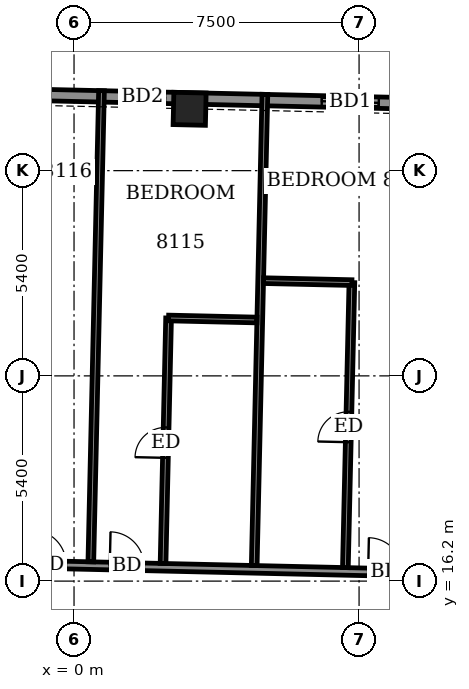
"""IFC4 building model, lengths in metres.
Left out: names, types, materials, properties, quantities, classifications, styles, units other than length and angle.
Written with IfcOpenShell. Run it as: python <this file> out.ifc"""

import sys

from ifc_helpers import new_model, si_unit, direction, frame, frame_2d, origin, origin_2d, place, context, subcontext, project, spatial, rectangle, extrude, element, fill, save


model = new_model("IFC4")
c1 = context("Model", 3, precision=1e-05, world=origin(), true_north=direction((0.0, 1.0)))
c2 = subcontext(c1, "Body", "Model", "MODEL_VIEW")
j1 = project(units=[si_unit("LENGTHUNIT", "METRE"), si_unit("PLANEANGLEUNIT", "RADIAN")], contexts=[c1])
p1 = place(None, origin())
s1 = spatial("IfcSite", under=j1, at=p1, CompositionType="ELEMENT")
p2 = place(p1, origin())
s2 = spatial("IfcBuilding", under=s1, at=p2, CompositionType="ELEMENT")
p3 = place(p2, frame((0.0, 0.0, 316.9)))
s3 = spatial("IfcBuildingStorey", under=s2, at=p3, CompositionType="ELEMENT", Elevation=316.9)
p4 = place(p3, frame((3.041, 28.627, -0.55), z_axis=(0.0, 0.0, 1.0), x_axis=(-0.999741662484, 0.022729018737, 0.0)))
e1 = element("IfcColumn", 1, at=p4, inside=s3, PredefinedType="COLUMN", context=c2, shape_type="SweptSolid", body=[
    extrude(rectangle(XDim=0.85, YDim=0.85, at=origin_2d()), origin(), (0.0, 0.0, 1.0), 3.6),
])
p5 = place(p3, frame((25.264, 28.397, 0.0), z_axis=(0.0, 0.0, 1.0), x_axis=(-0.999742391375, 0.022696935658, 0.0)))
e2 = element("IfcWall", 2, at=p5, inside=s3, PredefinedType="SOLIDWALL", context=c2, shape_type="SweptSolid", body=[
    extrude(rectangle(XDim=51.9, YDim=0.3, at=frame_2d((25.95, 0.0))), origin(), (0.0, 0.0, 1.0), 2.45),
])
p6 = place(p5, frame((0.874, 0.0, 0.0)))
e3 = element("IfcOpeningElement", 3, at=p6, cuts=e2, PredefinedType="OPENING", context=c2, shape_type="SweptSolid", body=[
    extrude(rectangle(XDim=1.5, YDim=2.4, at=frame_2d((0.75, 1.2))), frame((0.0, 0.16, 0.0), z_axis=(0.0, -1.0, 0.0), x_axis=(1.0, 0.0, 0.0)), (0.0, 0.0, 1.0), 0.32),
])
p7 = place(p5, frame((4.241, 0.0, 0.0)))
e4 = element("IfcOpeningElement", 4, at=p7, cuts=e2, PredefinedType="OPENING", context=c2, shape_type="SweptSolid", body=[
    extrude(rectangle(XDim=1.5, YDim=2.4, at=frame_2d((0.75, 1.2))), frame((0.0, 0.16, 0.0), z_axis=(0.0, -1.0, 0.0), x_axis=(1.0, 0.0, 0.0)), (0.0, 0.0, 1.0), 0.32),
])
p8 = place(p5, frame((8.691, 0.0, 0.0)))
e5 = element("IfcOpeningElement", 5, at=p8, cuts=e2, PredefinedType="OPENING", context=c2, shape_type="SweptSolid", body=[
    extrude(rectangle(XDim=1.5, YDim=2.4, at=frame_2d((0.75, 1.2))), frame((0.0, 0.16, 0.0), z_axis=(0.0, -1.0, 0.0), x_axis=(1.0, 0.0, 0.0)), (0.0, 0.0, 1.0), 0.32),
])
p9 = place(p5, frame((12.245, 0.0, 0.0)))
e6 = element("IfcOpeningElement", 6, at=p9, cuts=e2, PredefinedType="OPENING", context=c2, shape_type="SweptSolid", body=[
    extrude(rectangle(XDim=1.5, YDim=2.4, at=frame_2d((0.75, 1.2))), frame((0.0, 0.16, 0.0), z_axis=(0.0, -1.0, 0.0), x_axis=(1.0, 0.0, 0.0)), (0.0, 0.0, 1.0), 0.32),
])
p10 = place(p5, frame((17.25, 0.0, 0.0)))
e7 = element("IfcOpeningElement", 7, at=p10, cuts=e2, PredefinedType="OPENING", context=c2, shape_type="SweptSolid", body=[
    extrude(rectangle(XDim=1.5, YDim=2.4, at=frame_2d((0.75, 1.2))), frame((0.0, 0.16, 0.0), z_axis=(0.0, -1.0, 0.0), x_axis=(1.0, 0.0, 0.0)), (0.0, 0.0, 1.0), 0.32),
])
p11 = place(p5, frame((22.874, 0.0, 0.0)))
e8 = element("IfcOpeningElement", 8, at=p11, cuts=e2, PredefinedType="OPENING", context=c2, shape_type="SweptSolid", body=[
    extrude(rectangle(XDim=1.2, YDim=2.4, at=frame_2d((0.6, 1.2))), frame((0.0, 0.16, 0.0), z_axis=(0.0, -1.0, 0.0), x_axis=(1.0, 0.0, 0.0)), (0.0, 0.0, 1.0), 0.32),
])
p12 = place(p5, frame((26.1, 0.0, 0.0)))
e9 = element("IfcOpeningElement", 9, at=p12, cuts=e2, PredefinedType="OPENING", context=c2, shape_type="SweptSolid", body=[
    extrude(rectangle(XDim=1.5, YDim=2.4, at=frame_2d((0.75, 1.2))), frame((0.0, 0.16, 0.0), z_axis=(0.0, -1.0, 0.0), x_axis=(1.0, 0.0, 0.0)), (0.0, 0.0, 1.0), 0.32),
])
p13 = place(p5, frame((30.977, 0.0, 0.0)))
e10 = element("IfcOpeningElement", 10, at=p13, cuts=e2, PredefinedType="OPENING", context=c2, shape_type="SweptSolid", body=[
    extrude(rectangle(XDim=1.5, YDim=2.4, at=frame_2d((0.75, 1.2))), frame((0.0, 0.16, 0.0), z_axis=(0.0, -1.0, 0.0), x_axis=(1.0, 0.0, 0.0)), (0.0, 0.0, 1.0), 0.32),
])
p14 = place(p5, frame((34.53, 0.0, 0.0)))
e11 = element("IfcOpeningElement", 11, at=p14, cuts=e2, PredefinedType="OPENING", context=c2, shape_type="SweptSolid", body=[
    extrude(rectangle(XDim=1.5, YDim=2.4, at=frame_2d((0.75, 1.2))), frame((0.0, 0.16, 0.0), z_axis=(0.0, -1.0, 0.0), x_axis=(1.0, 0.0, 0.0)), (0.0, 0.0, 1.0), 0.32),
])
p15 = place(p5, frame((39.425, 0.0, 0.0)))
e12 = element("IfcOpeningElement", 12, at=p15, cuts=e2, PredefinedType="OPENING", context=c2, shape_type="SweptSolid", body=[
    extrude(rectangle(XDim=1.5, YDim=2.4, at=frame_2d((0.75, 1.2))), frame((0.0, 0.16, 0.0), z_axis=(0.0, -1.0, 0.0), x_axis=(1.0, 0.0, 0.0)), (0.0, 0.0, 1.0), 0.32),
])
p16 = place(p5, frame((45.259, 0.0, 0.0)))
e13 = element("IfcOpeningElement", 13, at=p16, cuts=e2, PredefinedType="OPENING", context=c2, shape_type="SweptSolid", body=[
    extrude(rectangle(XDim=1.2, YDim=2.4, at=frame_2d((0.6, 1.2))), frame((0.0, 0.16, 0.0), z_axis=(0.0, -1.0, 0.0), x_axis=(1.0, 0.0, 0.0)), (0.0, 0.0, 1.0), 0.32),
])
p17 = place(p5, frame((47.987, 0.0, 0.9)))
e14 = element("IfcOpeningElement", 14, at=p17, cuts=e2, PredefinedType="OPENING", context=c2, shape_type="SweptSolid", body=[
    extrude(rectangle(XDim=2.4, YDim=1.5, at=frame_2d((1.2, 0.75))), frame((0.0, 0.16, 0.0), z_axis=(0.0, -1.0, 0.0), x_axis=(1.0, 0.0, 0.0)), (0.0, 0.0, 1.0), 0.32),
])
p18 = place(p3, frame((-30.652, 17.313, 0.0), z_axis=(0.0, 0.0, 1.0), x_axis=(0.999742623764, -0.02268669719, 0.0)))
e15 = element("IfcWall", 15, at=p18, inside=s3, PredefinedType="PARTITIONING", context=c2, shape_type="SweptSolid", body=[
    extrude(rectangle(XDim=58.8, YDim=0.2, at=frame_2d((29.4, 0.0))), origin(), (0.0, 0.0, 1.0), 3.05),
])
p19 = place(p18, frame((55.698, 0.0, 0.0)))
e16 = element("IfcOpeningElement", 16, at=p19, cuts=e15, PredefinedType="OPENING", context=c2, shape_type="SweptSolid", body=[
    extrude(rectangle(XDim=1.0, YDim=2.1, at=frame_2d((0.5, 1.05))), frame((0.0, 0.11, 0.0), z_axis=(0.0, -1.0, 0.0), x_axis=(1.0, 0.0, 0.0)), (0.0, 0.0, 1.0), 0.22),
])
p20 = place(p18, frame((49.0, 0.0, 0.0)))
e17 = element("IfcOpeningElement", 17, at=p20, cuts=e15, PredefinedType="OPENING", context=c2, shape_type="SweptSolid", body=[
    extrude(rectangle(XDim=0.9, YDim=2.1, at=frame_2d((0.45, 1.05))), frame((0.0, 0.11, 0.0), z_axis=(0.0, -1.0, 0.0), x_axis=(1.0, 0.0, 0.0)), (0.0, 0.0, 1.0), 0.22),
])
p21 = place(p18, frame((47.125, 0.0, 0.0)))
e18 = element("IfcOpeningElement", 18, at=p21, cuts=e15, PredefinedType="OPENING", context=c2, shape_type="SweptSolid", body=[
    extrude(rectangle(XDim=0.9, YDim=2.1, at=frame_2d((0.45, 1.05))), frame((0.0, 0.11, 0.0), z_axis=(0.0, -1.0, 0.0), x_axis=(1.0, 0.0, 0.0)), (0.0, 0.0, 1.0), 0.22),
])
p22 = place(p18, frame((40.425, 0.0, 0.0)))
e19 = element("IfcOpeningElement", 19, at=p22, cuts=e15, PredefinedType="OPENING", context=c2, shape_type="SweptSolid", body=[
    extrude(rectangle(XDim=0.9, YDim=2.1, at=frame_2d((0.45, 1.05))), frame((0.0, 0.11, 0.0), z_axis=(0.0, -1.0, 0.0), x_axis=(1.0, 0.0, 0.0)), (0.0, 0.0, 1.0), 0.22),
])
p23 = place(p18, frame((38.4, 0.0, 0.0)))
e20 = element("IfcOpeningElement", 20, at=p23, cuts=e15, PredefinedType="OPENING", context=c2, shape_type="SweptSolid", body=[
    extrude(rectangle(XDim=0.9, YDim=2.1, at=frame_2d((0.45, 1.05))), frame((0.0, 0.11, 0.0), z_axis=(0.0, -1.0, 0.0), x_axis=(1.0, 0.0, 0.0)), (0.0, 0.0, 1.0), 0.22),
])
p24 = place(p18, frame((31.6, 0.0, 0.0)))
e21 = element("IfcOpeningElement", 21, at=p24, cuts=e15, PredefinedType="OPENING", context=c2, shape_type="SweptSolid", body=[
    extrude(rectangle(XDim=0.9, YDim=2.1, at=frame_2d((0.45, 1.05))), frame((0.0, 0.11, 0.0), z_axis=(0.0, -1.0, 0.0), x_axis=(1.0, 0.0, 0.0)), (0.0, 0.0, 1.0), 0.22),
])
p25 = place(p18, frame((29.55, 0.0, 0.0)))
e22 = element("IfcOpeningElement", 22, at=p25, cuts=e15, PredefinedType="OPENING", context=c2, shape_type="SweptSolid", body=[
    extrude(rectangle(XDim=0.9, YDim=2.1, at=frame_2d((0.45, 1.05))), frame((0.0, 0.11, 0.0), z_axis=(0.0, -1.0, 0.0), x_axis=(1.0, 0.0, 0.0)), (0.0, 0.0, 1.0), 0.22),
])
p26 = place(p18, frame((22.625, 0.0, 0.0)))
e23 = element("IfcOpeningElement", 23, at=p26, cuts=e15, PredefinedType="OPENING", context=c2, shape_type="SweptSolid", body=[
    extrude(rectangle(XDim=0.9, YDim=2.1, at=frame_2d((0.45, 1.05))), frame((0.0, 0.11, 0.0), z_axis=(0.0, -1.0, 0.0), x_axis=(1.0, 0.0, 0.0)), (0.0, 0.0, 1.0), 0.22),
])
p27 = place(p18, frame((20.625, 0.0, 0.0)))
e24 = element("IfcOpeningElement", 24, at=p27, cuts=e15, PredefinedType="OPENING", context=c2, shape_type="SweptSolid", body=[
    extrude(rectangle(XDim=0.9, YDim=2.1, at=frame_2d((0.45, 1.05))), frame((0.0, 0.11, 0.0), z_axis=(0.0, -1.0, 0.0), x_axis=(1.0, 0.0, 0.0)), (0.0, 0.0, 1.0), 0.22),
])
p28 = place(p18, frame((13.825, 0.0, 0.0)))
e25 = element("IfcOpeningElement", 25, at=p28, cuts=e15, PredefinedType="OPENING", context=c2, shape_type="SweptSolid", body=[
    extrude(rectangle(XDim=0.9, YDim=2.1, at=frame_2d((0.45, 1.05))), frame((0.0, 0.11, 0.0), z_axis=(0.0, -1.0, 0.0), x_axis=(1.0, 0.0, 0.0)), (0.0, 0.0, 1.0), 0.22),
])
p29 = place(p18, frame((11.725, 0.0, 0.0)))
e26 = element("IfcOpeningElement", 26, at=p29, cuts=e15, PredefinedType="OPENING", context=c2, shape_type="SweptSolid", body=[
    extrude(rectangle(XDim=0.9, YDim=2.1, at=frame_2d((0.45, 1.05))), frame((0.0, 0.11, 0.0), z_axis=(0.0, -1.0, 0.0), x_axis=(1.0, 0.0, 0.0)), (0.0, 0.0, 1.0), 0.22),
])
p30 = place(p18, frame((1.85, 0.0, 0.0)))
e27 = element("IfcOpeningElement", 27, at=p30, cuts=e15, PredefinedType="OPENING", context=c2, shape_type="SweptSolid", body=[
    extrude(rectangle(XDim=1.0, YDim=2.1, at=frame_2d((0.5, 1.05))), frame((0.0, 0.11, 0.0), z_axis=(0.0, -1.0, 0.0), x_axis=(1.0, 0.0, 0.0)), (0.0, 0.0, 1.0), 0.22),
])
p31 = place(p18, frame((6.95, 0.0, 0.0)))
e28 = element("IfcOpeningElement", 28, at=p31, cuts=e15, PredefinedType="OPENING", context=c2, shape_type="SweptSolid", body=[
    extrude(rectangle(XDim=0.9, YDim=2.1, at=frame_2d((0.45, 1.05))), frame((0.0, 0.11, 0.0), z_axis=(0.0, -1.0, 0.0), x_axis=(1.0, 0.0, 0.0)), (0.0, 0.0, 1.0), 0.22),
])
p32 = place(p3, frame((0.442, 16.708, 0.0), z_axis=(0.0, 0.0, 1.0), x_axis=(0.022663260168, 0.999743155335, 0.0)))
e29 = element("IfcWall", 29, at=p32, inside=s3, PredefinedType="PARTITIONING", context=c2, shape_type="SweptSolid", body=[
    extrude(rectangle(XDim=12.399, YDim=0.15, at=frame_2d((6.2, 0.0))), origin(), (0.0, 0.0, 1.0), 2.45),
])
p33 = place(p3, frame((2.342, 16.664, 0.0), z_axis=(0.0, 0.0, 1.0), x_axis=(0.022597796078, 0.999744637201, 0.0)))
e30 = element("IfcWall", 30, at=p33, inside=s3, PredefinedType="PARTITIONING", context=c2, shape_type="SweptSolid", body=[
    extrude(rectangle(XDim=6.461, YDim=0.15, at=frame_2d((3.23, 0.0))), origin(), (0.0, 0.0, 1.0), 3.05),
])
p34 = place(p33, frame((2.78, 0.0, 0.0)))
e31 = element("IfcOpeningElement", 31, at=p34, cuts=e30, PredefinedType="OPENING", context=c2, shape_type="SweptSolid", body=[
    extrude(rectangle(XDim=0.8, YDim=2.1, at=frame_2d((0.4, 1.05))), frame((0.0, 0.085, 0.0), z_axis=(0.0, -1.0, 0.0), x_axis=(1.0, 0.0, 0.0)), (0.0, 0.0, 1.0), 0.17),
])
p35 = place(p3, frame((4.741, 16.61, 0.0), z_axis=(0.0, 0.0, 1.0), x_axis=(0.022661475803, 0.999743195783, 0.0)))
e32 = element("IfcWall", 32, at=p35, inside=s3, PredefinedType="PARTITIONING", context=c2, shape_type="SweptSolid", body=[
    extrude(rectangle(XDim=12.4, YDim=0.15, at=frame_2d((6.2, 0.0))), origin(), (0.0, 0.0, 1.0), 2.45),
])
p36 = place(p3, frame((7.14, 16.556, 0.0), z_axis=(0.0, 0.0, 1.0), x_axis=(0.022819011082, 0.999739612466, 0.0)))
e33 = element("IfcWall", 33, at=p36, inside=s3, PredefinedType="PARTITIONING", context=c2, shape_type="SweptSolid", body=[
    extrude(rectangle(XDim=7.5, YDim=0.15, at=frame_2d((3.75, 0.0))), origin(), (0.0, 0.0, 1.0), 3.05),
])
p37 = place(p36, frame((3.3, 0.0, 0.0)))
e34 = element("IfcOpeningElement", 34, at=p37, cuts=e33, PredefinedType="OPENING", context=c2, shape_type="SweptSolid", body=[
    extrude(rectangle(XDim=0.8, YDim=2.1, at=frame_2d((0.4, 1.05))), frame((0.0, 0.085, 0.0), z_axis=(0.0, -1.0, 0.0), x_axis=(1.0, 0.0, 0.0)), (0.0, 0.0, 1.0), 0.17),
])
for number, where, z_axis, x_axis in (
    (35, (2.488, 23.123, 0.0), (0.0, 0.0, 1.0), (1.0, -0.023, 0.0)),
    (36, (4.986, 24.106, 0.0), (0.0, 0.0, 1.0), (1.0, -0.022, 0.0)),
):
    element("IfcWall", number, at=place(p3, frame(where, z_axis=z_axis, x_axis=x_axis)), inside=s3, PredefinedType="PARTITIONING", context=c2, shape_type="SweptSolid", body=[
        extrude(rectangle(XDim=2.325, YDim=0.15, at=frame_2d((1.163, 0.0))), origin(), (0.0, 0.0, 1.0), 3.05),
    ])
p38 = place(p10, origin())
e37 = element("IfcDoor", 37, at=p38, inside=s3, OperationType="SLIDING_TO_LEFT", PredefinedType="DOOR", context=c2, shape_type="SweptSolid", body=[
    extrude(rectangle(XDim=1.5, YDim=2.4, at=frame_2d((0.75, 1.2))), frame((0.0, 0.025, 0.0), z_axis=(0.0, -1.0, 0.0), x_axis=(1.0, 0.0, 0.0)), (0.0, 0.0, 1.0), 0.05),
])
fill(e7, e37)
p39 = place(p11, origin())
e38 = element("IfcDoor", 38, at=p39, inside=s3, OperationType="SLIDING_TO_LEFT", PredefinedType="DOOR", context=c2, shape_type="SweptSolid", body=[
    extrude(rectangle(XDim=1.2, YDim=2.4, at=frame_2d((0.6, 1.2))), frame((0.0, 0.025, 0.0), z_axis=(0.0, -1.0, 0.0), x_axis=(1.0, 0.0, 0.0)), (0.0, 0.0, 1.0), 0.05),
])
fill(e8, e38)
p40 = place(p23, origin())
e39 = element("IfcDoor", 39, at=p40, inside=s3, OperationType="SINGLE_SWING_RIGHT", PredefinedType="DOOR", context=c2, shape_type="SweptSolid", body=[
    extrude(rectangle(XDim=0.9, YDim=2.1, at=frame_2d((0.45, 1.05))), frame((0.0, 0.025, 0.0), z_axis=(0.0, -1.0, 0.0), x_axis=(1.0, 0.0, 0.0)), (0.0, 0.0, 1.0), 0.05),
])
fill(e20, e39)
p41 = place(p37, origin())
e40 = element("IfcDoor", 40, at=p41, inside=s3, OperationType="SINGLE_SWING_RIGHT", PredefinedType="DOOR", context=c2, shape_type="SweptSolid", body=[
    extrude(rectangle(XDim=0.8, YDim=2.1, at=frame_2d((0.4, 1.05))), frame((0.0, 0.025, 0.0), z_axis=(0.0, -1.0, 0.0), x_axis=(1.0, 0.0, 0.0)), (0.0, 0.0, 1.0), 0.05),
])
fill(e34, e40)
p42 = place(p24, origin())
e41 = element("IfcDoor", 41, at=p42, inside=s3, OperationType="SINGLE_SWING_LEFT", PredefinedType="DOOR", context=c2, shape_type="SweptSolid", body=[
    extrude(rectangle(XDim=0.9, YDim=2.1, at=frame_2d((0.45, 1.05))), frame((0.0, 0.025, 0.0), z_axis=(0.0, -1.0, 0.0), x_axis=(1.0, 0.0, 0.0)), (0.0, 0.0, 1.0), 0.05),
])
fill(e21, e41)
p43 = place(p34, origin())
e42 = element("IfcDoor", 42, at=p43, inside=s3, OperationType="SINGLE_SWING_LEFT", PredefinedType="DOOR", context=c2, shape_type="SweptSolid", body=[
    extrude(rectangle(XDim=0.8, YDim=2.1, at=frame_2d((0.4, 1.05))), frame((0.0, 0.025, 0.0), z_axis=(0.0, -1.0, 0.0), x_axis=(1.0, 0.0, 0.0)), (0.0, 0.0, 1.0), 0.05),
])
fill(e31, e42)
p44 = place(p25, origin())
e43 = element("IfcDoor", 43, at=p44, inside=s3, OperationType="SINGLE_SWING_RIGHT", PredefinedType="DOOR", context=c2, shape_type="SweptSolid", body=[
    extrude(rectangle(XDim=0.9, YDim=2.1, at=frame_2d((0.45, 1.05))), frame((0.0, 0.025, 0.0), z_axis=(0.0, -1.0, 0.0), x_axis=(1.0, 0.0, 0.0)), (0.0, 0.0, 1.0), 0.05),
])
fill(e22, e43)
save(model, sys.argv[1])
